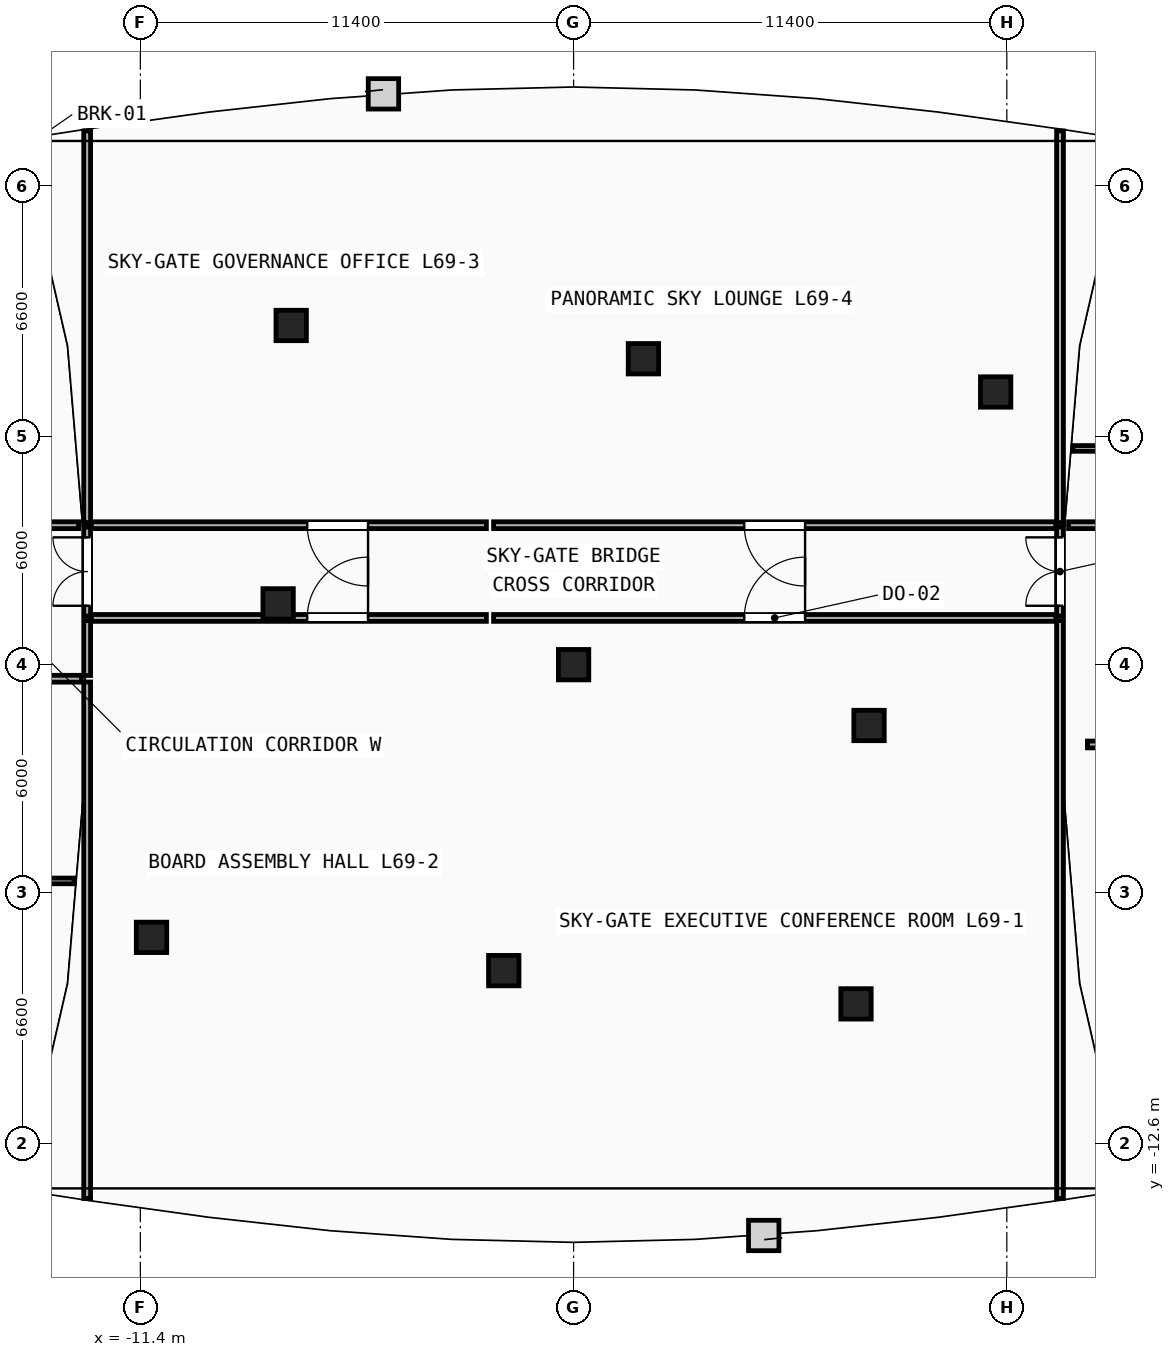
"""IFC4 building model, lengths in metres.
Left out: names, types, materials, properties, quantities, classifications, styles, units other than length and angle.
Written with IfcOpenShell. Run it as: python <this file> out.ifc"""

import sys

from ifc_helpers import new_model, si_unit, direction, frame, frame_2d, origin, origin_2d, place, context, subcontext, project, spatial, rectangle, extrude, element, fill, save


model = new_model("IFC4")
c1 = context("Model", 3, precision=1e-05, world=origin(), true_north=direction((0.0, 1.0)))
c2 = subcontext(c1, "Body", "Model", "MODEL_VIEW")
j1 = project(units=[si_unit("LENGTHUNIT", "METRE"), si_unit("PLANEANGLEUNIT", "RADIAN")], contexts=[c1])
p1 = place(None, origin())
s1 = spatial("IfcSite", under=j1, at=p1, CompositionType="ELEMENT")
p2 = place(p1, origin())
s2 = spatial("IfcBuilding", under=s1, at=p2, CompositionType="ELEMENT")
p3 = place(p2, frame((0.0, 0.0, 261.2)))
s3 = spatial("IfcBuildingStorey", under=s2, at=p3, CompositionType="ELEMENT", Elevation=261.2)
for number, where, z_axis, x_axis in (
    (1, (-11.106, -7.175, 0.0), (0.0, 0.0, 1.0), (1.0, 0.0, 0.0)),
    (2, (-1.837, -8.05, 0.0), (0.0, 0.0, 1.0), (1.0, 0.0, 0.0)),
    (3, (7.431, -8.925, 0.0), (0.0, 0.0, 1.0), (1.0, 0.0, 0.0)),
    (4, (-7.775, 1.6, 0.0), (0.0, 0.0, 1.0), (1.0, 0.0, 0.0)),
    (5, (0.0, 0.0, 0.0), (0.0, 0.0, 1.0), (1.0, 0.0, 0.0)),
    (6, (7.775, -1.6, 0.0), (0.0, 0.0, 1.0), (1.0, 0.0, 0.0)),
    (7, (-7.431, 8.925, 0.0), (0.0, 0.0, 1.0), (1.0, 0.0, 0.0)),
    (8, (1.837, 8.05, 0.0), (0.0, 0.0, 1.0), (1.0, 0.0, 0.0)),
    (9, (11.106, 7.175, 0.0), (0.0, 0.0, 1.0), (1.0, 0.0, 0.0)),
):
    element("IfcColumn", number, at=place(p3, frame(where, z_axis=z_axis, x_axis=x_axis)), inside=s3, PredefinedType="COLUMN", context=c2, shape_type="SweptSolid", body=[
        extrude(rectangle(XDim=0.8, YDim=0.8, at=origin_2d()), origin(), (0.0, 0.0, 1.0), 3.6),
    ])
p4 = place(p3, frame((-28.35, -5.69, 0.0), z_axis=(0.0, 0.0, 1.0), x_axis=(1.0, 0.0, 0.0)))
e10 = element("IfcWall", 10, at=p4, inside=s3, PredefinedType="PARTITIONING", context=c2, shape_type="SweptSolid", body=[
    extrude(rectangle(XDim=15.21, YDim=0.15, at=frame_2d((7.605, 0.0))), origin(), (0.0, 0.0, 1.0), 3.34),
])
p5 = place(p3, frame((-28.3, -0.37, 0.0), z_axis=(0.0, 0.0, 1.0), x_axis=(1.0, 0.0, 0.0)))
e11 = element("IfcWall", 11, at=p5, inside=s3, PredefinedType="PARTITIONING", context=c2, shape_type="SweptSolid", body=[
    extrude(rectangle(XDim=15.349, YDim=0.18, at=frame_2d((7.675, 0.0))), origin(), (0.0, 0.0, 1.0), 3.34),
])
p6 = place(p5, frame((7.175, 0.0, 0.0)))
e12 = element("IfcOpeningElement", 12, at=p6, cuts=e11, PredefinedType="OPENING", context=c2, shape_type="SweptSolid", body=[
    extrude(rectangle(XDim=1.0, YDim=2.15, at=frame_2d((0.5, 1.075))), frame((0.0, 0.1, 0.0), z_axis=(0.0, -1.0, 0.0), x_axis=(1.0, 0.0, 0.0)), (0.0, 0.0, 1.0), 0.2),
])
p7 = place(p3, frame((-13.026, 3.67, 0.0), z_axis=(0.0, 0.0, 1.0), x_axis=(-1.0, 0.0, 0.0)))
e13 = element("IfcWall", 13, at=p7, inside=s3, PredefinedType="PARTITIONING", context=c2, shape_type="SweptSolid", body=[
    extrude(rectangle(XDim=3.753, YDim=0.18, at=frame_2d((1.876, 0.0))), origin(), (0.0, 0.0, 1.0), 3.34),
])
p8 = place(p3, frame((13.14, 5.69, 0.0), z_axis=(0.0, 0.0, 1.0), x_axis=(1.0, 0.0, 0.0)))
e14 = element("IfcWall", 14, at=p8, inside=s3, PredefinedType="PARTITIONING", context=c2, shape_type="SweptSolid", body=[
    extrude(rectangle(XDim=15.21, YDim=0.15, at=frame_2d((7.605, 0.0))), origin(), (0.0, 0.0, 1.0), 3.34),
])
p9 = place(p3, frame((13.521, -2.1, 0.0), z_axis=(0.0, 0.0, 1.0), x_axis=(1.0, 0.0, 0.0)))
e15 = element("IfcWall", 15, at=p9, inside=s3, PredefinedType="PARTITIONING", context=c2, shape_type="SweptSolid", body=[
    extrude(rectangle(XDim=7.398, YDim=0.18, at=frame_2d((3.699, 0.0))), origin(), (0.0, 0.0, 1.0), 3.34),
])
p10 = place(p9, frame((3.199, 0.0, 0.0)))
e16 = element("IfcOpeningElement", 16, at=p10, cuts=e15, PredefinedType="OPENING", context=c2, shape_type="SweptSolid", body=[
    extrude(rectangle(XDim=1.0, YDim=2.15, at=frame_2d((0.5, 1.075))), frame((0.0, 0.1, 0.0), z_axis=(0.0, -1.0, 0.0), x_axis=(1.0, 0.0, 0.0)), (0.0, 0.0, 1.0), 0.2),
])
p11 = place(p3, frame((16.779, 3.67, 0.0), z_axis=(0.0, 0.0, 1.0), x_axis=(-1.0, 0.0, 0.0)))
e17 = element("IfcWall", 17, at=p11, inside=s3, PredefinedType="PARTITIONING", context=c2, shape_type="SweptSolid", body=[
    extrude(rectangle(XDim=3.753, YDim=0.18, at=frame_2d((1.876, 0.0))), origin(), (0.0, 0.0, 1.0), 3.34),
])
p12 = place(p3, frame((-2.105, 1.23, 0.0), z_axis=(0.0, 0.0, 1.0), x_axis=(1.0, 0.0, 0.0)))
e18 = element("IfcWall", 18, at=p12, inside=s3, PredefinedType="PARTITIONING", context=c2, shape_type="SweptSolid", body=[
    extrude(rectangle(XDim=14.793, YDim=0.18, at=frame_2d((7.397, 0.0))), origin(), (0.0, 0.0, 1.0), 3.34),
])
p13 = place(p12, frame((6.597, 0.0, 0.0)))
e19 = element("IfcOpeningElement", 19, at=p13, cuts=e18, PredefinedType="OPENING", context=c2, shape_type="SweptSolid", body=[
    extrude(rectangle(XDim=1.6, YDim=2.2, at=frame_2d((0.8, 1.1))), frame((0.0, 0.1, 0.0), z_axis=(0.0, -1.0, 0.0), x_axis=(1.0, 0.0, 0.0)), (0.0, 0.0, 1.0), 0.2),
])
p14 = place(p3, frame((-12.688, 1.23, 0.0), z_axis=(0.0, 0.0, 1.0), x_axis=(1.0, 0.0, 0.0)))
e20 = element("IfcWall", 20, at=p14, inside=s3, PredefinedType="PARTITIONING", context=c2, shape_type="SweptSolid", body=[
    extrude(rectangle(XDim=10.394, YDim=0.18, at=frame_2d((5.197, 0.0))), origin(), (0.0, 0.0, 1.0), 2.663),
])
p15 = place(p14, frame((5.68, 0.0, 0.0)))
e21 = element("IfcOpeningElement", 21, at=p15, cuts=e20, PredefinedType="OPENING", context=c2, shape_type="SweptSolid", body=[
    extrude(rectangle(XDim=1.6, YDim=2.2, at=frame_2d((0.8, 1.1))), frame((0.0, 0.1, 0.0), z_axis=(0.0, -1.0, 0.0), x_axis=(1.0, 0.0, 0.0)), (0.0, 0.0, 1.0), 0.2),
])
p16 = place(p3, frame((-2.295, 3.67, 0.0), z_axis=(0.0, 0.0, 1.0), x_axis=(-1.0, 0.0, 0.0)))
e22 = element("IfcWall", 22, at=p16, inside=s3, PredefinedType="PARTITIONING", context=c2, shape_type="SweptSolid", body=[
    extrude(rectangle(XDim=10.394, YDim=0.18, at=frame_2d((5.197, 0.0))), origin(), (0.0, 0.0, 1.0), 3.34),
])
p17 = place(p16, frame((3.114, 0.0, 0.0)))
e23 = element("IfcOpeningElement", 23, at=p17, cuts=e22, PredefinedType="OPENING", context=c2, shape_type="SweptSolid", body=[
    extrude(rectangle(XDim=1.6, YDim=2.2, at=frame_2d((0.8, 1.1))), frame((0.0, 0.1, 0.0), z_axis=(0.0, -1.0, 0.0), x_axis=(1.0, 0.0, 0.0)), (0.0, 0.0, 1.0), 0.2),
])
p18 = place(p3, frame((12.688, 3.67, 0.0), z_axis=(0.0, 0.0, 1.0), x_axis=(-1.0, 0.0, 0.0)))
e24 = element("IfcWall", 24, at=p18, inside=s3, PredefinedType="PARTITIONING", context=c2, shape_type="SweptSolid", body=[
    extrude(rectangle(XDim=14.793, YDim=0.18, at=frame_2d((7.397, 0.0))), origin(), (0.0, 0.0, 1.0), 3.34),
])
p19 = place(p18, frame((6.597, 0.0, 0.0)))
e25 = element("IfcOpeningElement", 25, at=p19, cuts=e24, PredefinedType="OPENING", context=c2, shape_type="SweptSolid", body=[
    extrude(rectangle(XDim=1.6, YDim=2.2, at=frame_2d((0.8, 1.1))), frame((0.0, 0.1, 0.0), z_axis=(0.0, -1.0, 0.0), x_axis=(1.0, 0.0, 0.0)), (0.0, 0.0, 1.0), 0.2),
])
p20 = place(p3, frame((-12.8, -14.044, 0.0), z_axis=(0.0, 0.0, 1.0), x_axis=(0.0, 1.0, 0.0)))
e26 = element("IfcWall", 26, at=p20, inside=s3, PredefinedType="PARTITIONING", context=c2, shape_type="SweptSolid", body=[
    extrude(rectangle(XDim=13.589, YDim=0.18, at=frame_2d((6.794, 0.0))), origin(), (0.0, 0.0, 1.0), 3.34),
])
p21 = place(p3, frame((-12.8, -0.285, 0.0), z_axis=(0.0, 0.0, 1.0), x_axis=(0.0, 1.0, 0.0)))
e27 = element("IfcWall", 27, at=p21, inside=s3, PredefinedType="PARTITIONING", context=c2, shape_type="SweptSolid", body=[
    extrude(rectangle(XDim=1.445, YDim=0.18, at=frame_2d((0.722, 0.0))), origin(), (0.0, 0.0, 1.0), 3.34),
])
p22 = place(p3, frame((-12.8, 3.74, 0.0), z_axis=(0.0, 0.0, 1.0), x_axis=(0.0, 1.0, 0.0)))
e28 = element("IfcWall", 28, at=p22, inside=s3, PredefinedType="PARTITIONING", context=c2, shape_type="SweptSolid", body=[
    extrude(rectangle(XDim=10.304, YDim=0.18, at=frame_2d((5.152, 0.0))), origin(), (0.0, 0.0, 1.0), 3.34),
])
p23 = place(p3, frame((-12.8, 1.28, 0.0), z_axis=(0.0, 0.0, 1.0), x_axis=(0.0, 1.0, 0.0)))
e29 = element("IfcWall", 29, at=p23, inside=s3, PredefinedType="PARTITIONING", context=c2, shape_type="SweptSolid", body=[
    extrude(rectangle(XDim=2.34, YDim=0.18, at=frame_2d((1.17, 0.0))), origin(), (0.0, 0.0, 1.0), 3.34),
])
p24 = place(p23, frame((0.27, 0.0, 0.0)))
e30 = element("IfcOpeningElement", 30, at=p24, cuts=e29, PredefinedType="OPENING", context=c2, shape_type="SweptSolid", body=[
    extrude(rectangle(XDim=1.8, YDim=2.25, at=frame_2d((0.9, 1.125))), frame((0.0, 0.1, 0.0), z_axis=(0.0, -1.0, 0.0), x_axis=(1.0, 0.0, 0.0)), (0.0, 0.0, 1.0), 0.2),
])
p25 = place(p3, frame((12.8, -14.044, 0.0), z_axis=(0.0, 0.0, 1.0), x_axis=(0.0, 1.0, 0.0)))
e31 = element("IfcWall", 31, at=p25, inside=s3, PredefinedType="PARTITIONING", context=c2, shape_type="SweptSolid", body=[
    extrude(rectangle(XDim=15.204, YDim=0.18, at=frame_2d((7.602, 0.0))), origin(), (0.0, 0.0, 1.0), 3.34),
])
p26 = place(p3, frame((12.8, 3.74, 0.0), z_axis=(0.0, 0.0, 1.0), x_axis=(0.0, 1.0, 0.0)))
e32 = element("IfcWall", 32, at=p26, inside=s3, PredefinedType="PARTITIONING", context=c2, shape_type="SweptSolid", body=[
    extrude(rectangle(XDim=10.304, YDim=0.18, at=frame_2d((5.152, 0.0))), origin(), (0.0, 0.0, 1.0), 3.34),
])
p27 = place(p3, frame((12.8, 1.28, 0.0), z_axis=(0.0, 0.0, 1.0), x_axis=(0.0, 1.0, 0.0)))
e33 = element("IfcWall", 33, at=p27, inside=s3, PredefinedType="PARTITIONING", context=c2, shape_type="SweptSolid", body=[
    extrude(rectangle(XDim=2.34, YDim=0.18, at=frame_2d((1.17, 0.0))), origin(), (0.0, 0.0, 1.0), 3.34),
])
p28 = place(p27, frame((0.27, 0.0, 0.0)))
e34 = element("IfcOpeningElement", 34, at=p28, cuts=e33, PredefinedType="OPENING", context=c2, shape_type="SweptSolid", body=[
    extrude(rectangle(XDim=1.8, YDim=2.25, at=frame_2d((0.9, 1.125))), frame((0.0, 0.1, 0.0), z_axis=(0.0, -1.0, 0.0), x_axis=(1.0, 0.0, 0.0)), (0.0, 0.0, 1.0), 0.2),
])
p29 = place(p13, origin())
e35 = element("IfcDoor", 35, at=p29, inside=s3, OperationType="SINGLE_SWING_RIGHT", PredefinedType="DOOR", context=c2, shape_type="SweptSolid", body=[
    extrude(rectangle(XDim=1.6, YDim=2.2, at=frame_2d((0.8, 1.1))), frame((0.0, 0.025, 0.0), z_axis=(0.0, -1.0, 0.0), x_axis=(1.0, 0.0, 0.0)), (0.0, 0.0, 1.0), 0.05),
])
fill(e19, e35)
p30 = place(p19, origin())
e36 = element("IfcDoor", 36, at=p30, inside=s3, OperationType="SINGLE_SWING_LEFT", PredefinedType="DOOR", context=c2, shape_type="SweptSolid", body=[
    extrude(rectangle(XDim=1.6, YDim=2.2, at=frame_2d((0.8, 1.1))), frame((0.0, 0.025, 0.0), z_axis=(0.0, -1.0, 0.0), x_axis=(1.0, 0.0, 0.0)), (0.0, 0.0, 1.0), 0.05),
])
fill(e25, e36)
p31 = place(p15, origin())
e37 = element("IfcDoor", 37, at=p31, inside=s3, OperationType="SINGLE_SWING_RIGHT", PredefinedType="DOOR", context=c2, shape_type="SweptSolid", body=[
    extrude(rectangle(XDim=1.6, YDim=2.2, at=frame_2d((0.8, 1.1))), frame((0.0, 0.025, 0.0), z_axis=(0.0, -1.0, 0.0), x_axis=(1.0, 0.0, 0.0)), (0.0, 0.0, 1.0), 0.05),
])
fill(e21, e37)
p32 = place(p17, origin())
e38 = element("IfcDoor", 38, at=p32, inside=s3, OperationType="SINGLE_SWING_LEFT", PredefinedType="DOOR", context=c2, shape_type="SweptSolid", body=[
    extrude(rectangle(XDim=1.6, YDim=2.2, at=frame_2d((0.8, 1.1))), frame((0.0, 0.025, 0.0), z_axis=(0.0, -1.0, 0.0), x_axis=(1.0, 0.0, 0.0)), (0.0, 0.0, 1.0), 0.05),
])
fill(e23, e38)
p33 = place(p24, origin())
e39 = element("IfcDoor", 39, at=p33, inside=s3, OperationType="DOUBLE_DOOR_SINGLE_SWING", PredefinedType="DOOR", context=c2, shape_type="SweptSolid", body=[
    extrude(rectangle(XDim=1.8, YDim=2.25, at=frame_2d((0.9, 1.125))), frame((0.0, 0.025, 0.0), z_axis=(0.0, -1.0, 0.0), x_axis=(1.0, 0.0, 0.0)), (0.0, 0.0, 1.0), 0.05),
])
fill(e30, e39)
p34 = place(p28, origin())
e40 = element("IfcDoor", 40, at=p34, inside=s3, OperationType="DOUBLE_DOOR_SINGLE_SWING", PredefinedType="DOOR", context=c2, shape_type="SweptSolid", body=[
    extrude(rectangle(XDim=1.8, YDim=2.25, at=frame_2d((0.9, 1.125))), frame((0.0, 0.025, 0.0), z_axis=(0.0, -1.0, 0.0), x_axis=(1.0, 0.0, 0.0)), (0.0, 0.0, 1.0), 0.05),
])
fill(e34, e40)
save(model, sys.argv[1])
